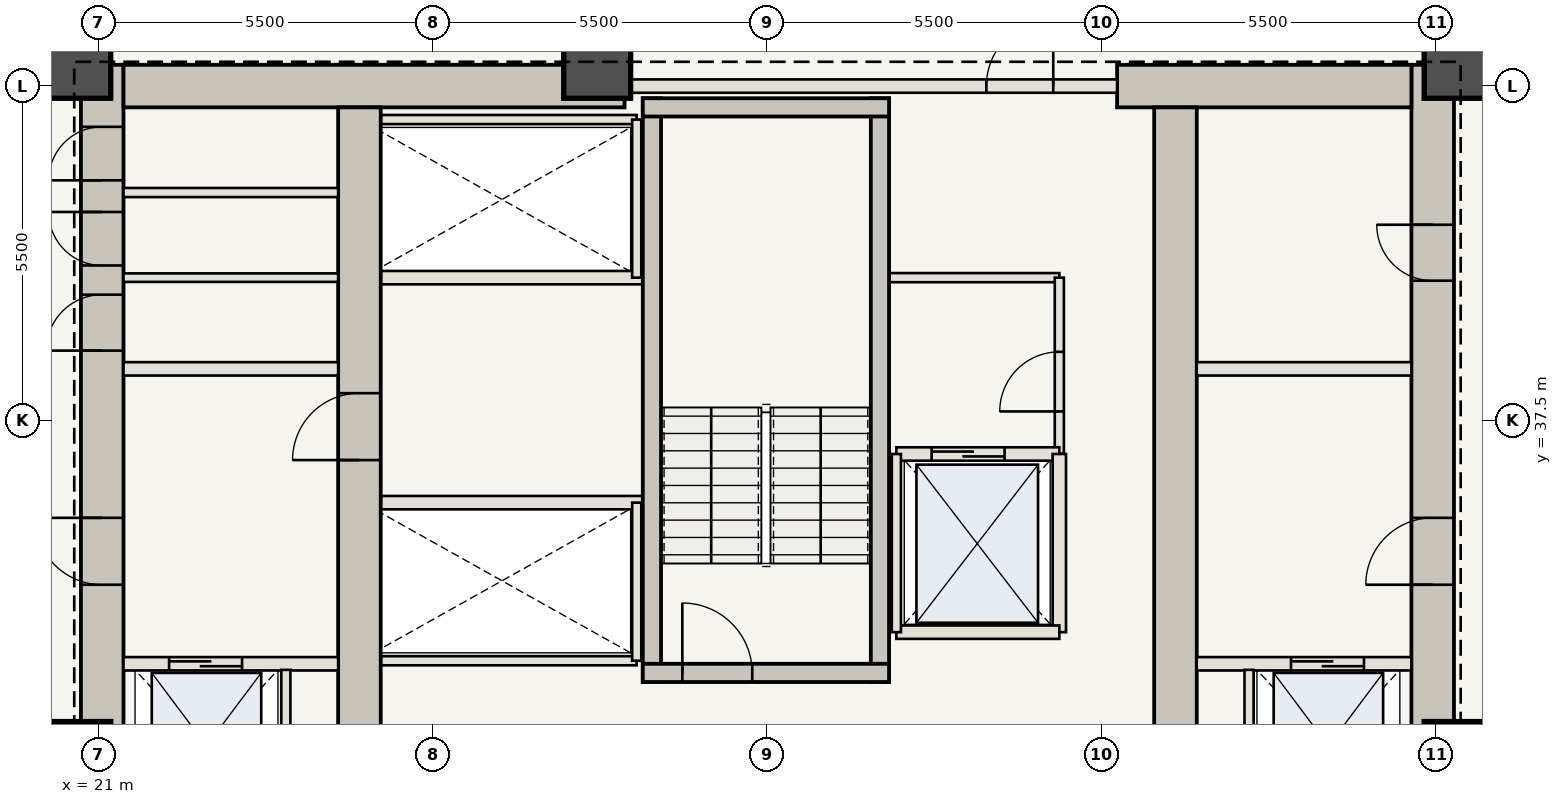
"""IFC4 building model, lengths in metres.
Left out: names, types, materials, properties, quantities, classifications, styles, units other than length and angle.
Written with IfcOpenShell. Run it as: python <this file> out.ifc"""

import sys

from ifc_helpers import new_model, si_unit, direction, frame, frame_2d, origin, origin_2d, place, context, subcontext, project, spatial, rectangle, extrude, element, fill, save


model = new_model("IFC4")
c1 = context("Model", 3, precision=1e-05, world=origin(), true_north=direction((0.0, 1.0)))
c2 = subcontext(c1, "Body", "Model", "MODEL_VIEW")
j1 = project(units=[si_unit("LENGTHUNIT", "METRE"), si_unit("PLANEANGLEUNIT", "RADIAN")], contexts=[c1])
p1 = place(None, origin())
s1 = spatial("IfcSite", under=j1, at=p1, CompositionType="ELEMENT")
p2 = place(p1, origin())
s2 = spatial("IfcBuilding", under=s1, at=p2, CompositionType="ELEMENT")
p3 = place(p2, frame((0.0, 0.0, 63.35)))
s3 = spatial("IfcBuildingStorey", under=s2, at=p3, CompositionType="ELEMENT", Elevation=63.35)
p4 = place(p3, frame((21.06, 30.6, 0.0), z_axis=(0.0, 0.0, 1.0), x_axis=(0.0, 1.0, 0.0)))
e1 = element("IfcWall", 1, at=p4, inside=s3, PredefinedType="SHEAR", context=c2, shape_type="SweptSolid", body=[
    extrude(rectangle(XDim=12.75, YDim=0.7, at=frame_2d((6.375, 0.0))), origin(), (0.0, 0.0, 1.0), 3.5),
])
p5 = place(p4, frame((4.2, 0.0, 0.0)))
e2 = element("IfcOpeningElement", 2, at=p5, cuts=e1, PredefinedType="OPENING", context=c2, shape_type="SweptSolid", body=[
    extrude(rectangle(XDim=1.1, YDim=2.15, at=frame_2d((0.55, 1.075))), frame((0.0, 0.36, 0.0), z_axis=(0.0, -1.0, 0.0), x_axis=(1.0, 0.0, 0.0)), (0.0, 0.0, 1.0), 0.72),
])
p6 = place(p4, frame((8.05, 0.0, 0.0)))
e3 = element("IfcOpeningElement", 3, at=p6, cuts=e1, PredefinedType="OPENING", context=c2, shape_type="SweptSolid", body=[
    extrude(rectangle(XDim=0.92, YDim=2.1, at=frame_2d((0.46, 1.05))), frame((0.0, 0.36, 0.0), z_axis=(0.0, -1.0, 0.0), x_axis=(1.0, 0.0, 0.0)), (0.0, 0.0, 1.0), 0.72),
])
p7 = place(p4, frame((9.45, 0.0, 0.0)))
e4 = element("IfcOpeningElement", 4, at=p7, cuts=e1, PredefinedType="OPENING", context=c2, shape_type="SweptSolid", body=[
    extrude(rectangle(XDim=0.88, YDim=2.1, at=frame_2d((0.44, 1.05))), frame((0.0, 0.36, 0.0), z_axis=(0.0, -1.0, 0.0), x_axis=(1.0, 0.0, 0.0)), (0.0, 0.0, 1.0), 0.72),
])
p8 = place(p4, frame((10.85, 0.0, 0.0)))
e5 = element("IfcOpeningElement", 5, at=p8, cuts=e1, PredefinedType="OPENING", context=c2, shape_type="SweptSolid", body=[
    extrude(rectangle(XDim=0.88, YDim=2.1, at=frame_2d((0.44, 1.05))), frame((0.0, 0.36, 0.0), z_axis=(0.0, -1.0, 0.0), x_axis=(1.0, 0.0, 0.0)), (0.0, 0.0, 1.0), 0.72),
])
p9 = place(p3, frame((42.94, 30.6, 0.0), z_axis=(0.0, 0.0, 1.0), x_axis=(0.0, 1.0, 0.0)))
e6 = element("IfcWall", 6, at=p9, inside=s3, PredefinedType="SHEAR", context=c2, shape_type="SweptSolid", body=[
    extrude(rectangle(XDim=12.75, YDim=0.7, at=frame_2d((6.375, 0.0))), origin(), (0.0, 0.0, 1.0), 3.5),
])
p10 = place(p9, frame((4.2, 0.0, 0.0)))
e7 = element("IfcOpeningElement", 7, at=p10, cuts=e6, PredefinedType="OPENING", context=c2, shape_type="SweptSolid", body=[
    extrude(rectangle(XDim=1.1, YDim=2.15, at=frame_2d((0.55, 1.075))), frame((0.0, 0.36, 0.0), z_axis=(0.0, -1.0, 0.0), x_axis=(1.0, 0.0, 0.0)), (0.0, 0.0, 1.0), 0.72),
])
p11 = place(p9, frame((9.2, 0.0, 0.0)))
e8 = element("IfcOpeningElement", 8, at=p11, cuts=e6, PredefinedType="OPENING", context=c2, shape_type="SweptSolid", body=[
    extrude(rectangle(XDim=0.92, YDim=2.1, at=frame_2d((0.46, 1.05))), frame((0.0, 0.36, 0.0), z_axis=(0.0, -1.0, 0.0), x_axis=(1.0, 0.0, 0.0)), (0.0, 0.0, 1.0), 0.72),
])
p12 = place(p3, frame((21.41, 43.0, 0.0), z_axis=(0.0, 0.0, 1.0), x_axis=(1.0, 0.0, 0.0)))
e9 = element("IfcWall", 9, at=p12, inside=s3, PredefinedType="SHEAR", context=c2, shape_type="SweptSolid", body=[
    extrude(rectangle(XDim=8.24, YDim=0.7, at=frame_2d((4.12, 0.0))), origin(), (0.0, 0.0, 1.0), 3.5),
])
p13 = place(p3, frame((37.75, 43.0, 0.0), z_axis=(0.0, 0.0, 1.0), x_axis=(1.0, 0.0, 0.0)))
e10 = element("IfcWall", 10, at=p13, inside=s3, PredefinedType="SHEAR", context=c2, shape_type="SweptSolid", body=[
    extrude(rectangle(XDim=4.84, YDim=0.7, at=frame_2d((2.42, 0.0))), origin(), (0.0, 0.0, 1.0), 3.5),
])
p14 = place(p3, frame((25.29, 30.6, 0.0), z_axis=(0.0, 0.0, 1.0), x_axis=(0.0, 1.0, 0.0)))
e11 = element("IfcWall", 11, at=p14, inside=s3, PredefinedType="SHEAR", context=c2, shape_type="SweptSolid", body=[
    extrude(rectangle(XDim=12.05, YDim=0.7, at=frame_2d((6.025, 0.0))), origin(), (0.0, 0.0, 1.0), 3.5),
])
p15 = place(p14, frame((6.25, 0.0, 0.0)))
e12 = element("IfcOpeningElement", 12, at=p15, cuts=e11, PredefinedType="OPENING", context=c2, shape_type="SweptSolid", body=[
    extrude(rectangle(XDim=1.1, YDim=2.15, at=frame_2d((0.55, 1.075))), frame((0.0, 0.36, 0.0), z_axis=(0.0, -1.0, 0.0), x_axis=(1.0, 0.0, 0.0)), (0.0, 0.0, 1.0), 0.72),
])
p16 = place(p3, frame((38.71, 30.6, 0.0), z_axis=(0.0, 0.0, 1.0), x_axis=(0.0, 1.0, 0.0)))
e13 = element("IfcWall", 13, at=p16, inside=s3, PredefinedType="SHEAR", context=c2, shape_type="SweptSolid", body=[
    extrude(rectangle(XDim=12.05, YDim=0.7, at=frame_2d((6.025, 0.0))), origin(), (0.0, 0.0, 1.0), 3.5),
])
for number, where, z_axis, x_axis in (
    (14, (43.35, 32.0, 0.0), (0.0, 0.0, 1.0), (1.0, 0.0, 0.0)),
    (15, (43.35, 43.35, 0.0), (0.0, 0.0, 1.0), (1.0, 0.0, 0.0)),
    (16, (29.2, 43.35, 0.0), (0.0, 0.0, 1.0), (1.0, 0.0, 0.0)),
    (17, (20.65, 43.35, 0.0), (0.0, 0.0, 1.0), (1.0, 0.0, 0.0)),
    (18, (20.65, 32.0, 0.0), (0.0, 0.0, 1.0), (1.0, 0.0, 0.0)),
):
    element("IfcColumn", number, at=place(p3, frame(where, z_axis=z_axis, x_axis=x_axis)), inside=s3, PredefinedType="COLUMN", context=c2, shape_type="SweptSolid", body=[
        extrude(rectangle(XDim=1.1, YDim=1.1, at=origin_2d()), origin(), (0.0, 0.0, 1.0), 3.5),
    ])
p17 = place(p3, frame((21.41, 33.5, 0.0), z_axis=(0.0, 0.0, 1.0), x_axis=(1.0, 0.0, 0.0)))
e19 = element("IfcWall", 19, at=p17, inside=s3, PredefinedType="STANDARD", context=c2, shape_type="SweptSolid", body=[
    extrude(rectangle(XDim=3.53, YDim=0.22, at=frame_2d((1.765, 0.0))), origin(), (0.0, 0.0, 1.0), 3.32),
])
p18 = place(p17, frame((0.75, 0.0, 0.0)))
e20 = element("IfcOpeningElement", 20, at=p18, cuts=e19, PredefinedType="OPENING", context=c2, shape_type="SweptSolid", body=[
    extrude(rectangle(XDim=1.2, YDim=2.2, at=frame_2d((0.6, 1.1))), frame((0.0, 0.12, 0.0), z_axis=(0.0, -1.0, 0.0), x_axis=(1.0, 0.0, 0.0)), (0.0, 0.0, 1.0), 0.24),
])
p19 = place(p3, frame((24.08, 30.75, 0.0), z_axis=(0.0, 0.0, 1.0), x_axis=(0.0, 1.0, 0.0)))
e21 = element("IfcWall", 21, at=p19, inside=s3, PredefinedType="STANDARD", context=c2, shape_type="SweptSolid", body=[
    extrude(rectangle(XDim=2.65, YDim=0.15, at=frame_2d((1.325, 0.0))), origin(), (0.0, 0.0, 1.0), 3.32),
])
p20 = place(p3, frame((39.06, 33.5, 0.0), z_axis=(0.0, 0.0, 1.0), x_axis=(1.0, 0.0, 0.0)))
e22 = element("IfcWall", 22, at=p20, inside=s3, PredefinedType="STANDARD", context=c2, shape_type="SweptSolid", body=[
    extrude(rectangle(XDim=3.53, YDim=0.22, at=frame_2d((1.765, 0.0))), origin(), (0.0, 0.0, 1.0), 3.32),
])
p21 = place(p20, frame((1.55, 0.0, 0.0)))
e23 = element("IfcOpeningElement", 23, at=p21, cuts=e22, PredefinedType="OPENING", context=c2, shape_type="SweptSolid", body=[
    extrude(rectangle(XDim=1.2, YDim=2.2, at=frame_2d((0.6, 1.1))), frame((0.0, 0.12, 0.0), z_axis=(0.0, -1.0, 0.0), x_axis=(1.0, 0.0, 0.0)), (0.0, 0.0, 1.0), 0.24),
])
p22 = place(p3, frame((39.92, 30.75, 0.0), z_axis=(0.0, 0.0, 1.0), x_axis=(0.0, 1.0, 0.0)))
e24 = element("IfcWall", 24, at=p22, inside=s3, PredefinedType="STANDARD", context=c2, shape_type="SweptSolid", body=[
    extrude(rectangle(XDim=2.65, YDim=0.15, at=frame_2d((1.325, 0.0))), origin(), (0.0, 0.0, 1.0), 3.32),
])
for number, where, z_axis, x_axis in (
    (25, (21.41, 38.35, 0.0), (0.0, 0.0, 1.0), (1.0, 0.0, 0.0)),
    (26, (39.06, 38.35, 0.0), (0.0, 0.0, 1.0), (1.0, 0.0, 0.0)),
):
    element("IfcWall", number, at=place(p3, frame(where, z_axis=z_axis, x_axis=x_axis)), inside=s3, PredefinedType="STANDARD", context=c2, shape_type="SweptSolid", body=[
        extrude(rectangle(XDim=3.53, YDim=0.22, at=frame_2d((1.765, 0.0))), origin(), (0.0, 0.0, 1.0), 3.32),
    ])
p23 = place(p3, frame((21.41, 39.85, 0.0), z_axis=(0.0, 0.0, 1.0), x_axis=(1.0, 0.0, 0.0)))
e27 = element("IfcWall", 27, at=p23, inside=s3, PredefinedType="STANDARD", context=c2, shape_type="SweptSolid", body=[
    extrude(rectangle(XDim=3.53, YDim=0.14, at=frame_2d((1.765, 0.0))), origin(), (0.0, 0.0, 1.0), 3.32),
])
p24 = place(p3, frame((21.41, 41.25, 0.0), z_axis=(0.0, 0.0, 1.0), x_axis=(1.0, 0.0, 0.0)))
e28 = element("IfcWall", 28, at=p24, inside=s3, PredefinedType="STANDARD", context=c2, shape_type="SweptSolid", body=[
    extrude(rectangle(XDim=3.53, YDim=0.15, at=frame_2d((1.765, 0.0))), origin(), (0.0, 0.0, 1.0), 3.32),
])
p25 = place(p3, frame((34.0, 39.85, 0.0), z_axis=(0.0, 0.0, 1.0), x_axis=(1.0, 0.0, 0.0)))
e29 = element("IfcWall", 29, at=p25, inside=s3, PredefinedType="STANDARD", context=c2, shape_type="SweptSolid", body=[
    extrude(rectangle(XDim=2.8, YDim=0.15, at=frame_2d((1.4, 0.0))), origin(), (0.0, 0.0, 1.0), 3.32),
])
p26 = place(p3, frame((36.8, 36.95, 0.0), z_axis=(0.0, 0.0, 1.0), x_axis=(0.0, 1.0, 0.0)))
e30 = element("IfcWall", 30, at=p26, inside=s3, PredefinedType="STANDARD", context=c2, shape_type="SweptSolid", body=[
    extrude(rectangle(XDim=2.9, YDim=0.15, at=frame_2d((1.45, 0.0))), origin(), (0.0, 0.0, 1.0), 3.32),
])
p27 = place(p26, frame((0.7, 0.0, 0.0)))
e31 = element("IfcOpeningElement", 31, at=p27, cuts=e30, PredefinedType="OPENING", context=c2, shape_type="SweptSolid", body=[
    extrude(rectangle(XDim=0.98, YDim=2.2, at=frame_2d((0.49, 1.1))), frame((0.0, 0.085, 0.0), z_axis=(0.0, -1.0, 0.0), x_axis=(1.0, 0.0, 0.0)), (0.0, 0.0, 1.0), 0.17),
])
p28 = place(p3, frame((25.65, 36.15, 0.0), z_axis=(0.0, 0.0, 1.0), x_axis=(1.0, 0.0, 0.0)))
e32 = element("IfcWall", 32, at=p28, inside=s3, PredefinedType="STANDARD", context=c2, shape_type="SweptSolid", body=[
    extrude(rectangle(XDim=4.3, YDim=0.22, at=frame_2d((2.15, 0.0))), origin(), (0.0, 0.0, 1.0), 3.32),
])
p29 = place(p3, frame((25.65, 33.55, 0.0), z_axis=(0.0, 0.0, 1.0), x_axis=(1.0, 0.0, 0.0)))
e33 = element("IfcWall", 33, at=p29, inside=s3, PredefinedType="STANDARD", context=c2, shape_type="SweptSolid", body=[
    extrude(rectangle(XDim=4.2, YDim=0.15, at=frame_2d((2.1, 0.0))), origin(), (0.0, 0.0, 1.0), 3.32),
])
p30 = place(p3, frame((29.85, 33.55, 0.0), z_axis=(0.0, 0.0, 1.0), x_axis=(0.0, 1.0, 0.0)))
e34 = element("IfcWall", 34, at=p30, inside=s3, PredefinedType="STANDARD", context=c2, shape_type="SweptSolid", body=[
    extrude(rectangle(XDim=2.6, YDim=0.15, at=frame_2d((1.3, 0.0))), origin(), (0.0, 0.0, 1.0), 3.32),
])
p31 = place(p3, frame((25.65, 39.85, 0.0), z_axis=(0.0, 0.0, 1.0), x_axis=(1.0, 0.0, 0.0)))
e35 = element("IfcWall", 35, at=p31, inside=s3, PredefinedType="STANDARD", context=c2, shape_type="SweptSolid", body=[
    extrude(rectangle(XDim=4.3, YDim=0.22, at=frame_2d((2.15, 0.0))), origin(), (0.0, 0.0, 1.0), 3.32),
])
p32 = place(p3, frame((25.65, 42.45, 0.0), z_axis=(0.0, 0.0, 1.0), x_axis=(1.0, 0.0, 0.0)))
e36 = element("IfcWall", 36, at=p32, inside=s3, PredefinedType="STANDARD", context=c2, shape_type="SweptSolid", body=[
    extrude(rectangle(XDim=4.2, YDim=0.15, at=frame_2d((2.1, 0.0))), origin(), (0.0, 0.0, 1.0), 3.32),
])
p33 = place(p3, frame((29.85, 39.85, 0.0), z_axis=(0.0, 0.0, 1.0), x_axis=(0.0, 1.0, 0.0)))
e37 = element("IfcWall", 37, at=p33, inside=s3, PredefinedType="STANDARD", context=c2, shape_type="SweptSolid", body=[
    extrude(rectangle(XDim=2.6, YDim=0.15, at=frame_2d((1.3, 0.0))), origin(), (0.0, 0.0, 1.0), 3.32),
])
for number, where, z_axis, x_axis in (
    (38, (30.1, 33.2, 0.0), (0.0, 0.0, 1.0), (0.0, 1.0, 0.0)),
    (39, (33.85, 33.2, 0.0), (0.0, 0.0, 1.0), (0.0, 1.0, 0.0)),
):
    element("IfcWall", number, at=place(p3, frame(where, z_axis=z_axis, x_axis=x_axis)), inside=s3, PredefinedType="SHEAR", context=c2, shape_type="SweptSolid", body=[
        extrude(rectangle(XDim=9.6, YDim=0.3, at=frame_2d((4.8, 0.0))), origin(), (0.0, 0.0, 1.0), 3.32),
    ])
p34 = place(p3, frame((29.95, 33.35, 0.0), z_axis=(0.0, 0.0, 1.0), x_axis=(1.0, 0.0, 0.0)))
e40 = element("IfcWall", 40, at=p34, inside=s3, PredefinedType="SHEAR", context=c2, shape_type="SweptSolid", body=[
    extrude(rectangle(XDim=4.05, YDim=0.3, at=frame_2d((2.025, 0.0))), origin(), (0.0, 0.0, 1.0), 3.32),
])
p35 = place(p34, frame((0.65, 0.0, 0.0)))
e41 = element("IfcOpeningElement", 41, at=p35, cuts=e40, PredefinedType="OPENING", context=c2, shape_type="SweptSolid", body=[
    extrude(rectangle(XDim=1.15, YDim=2.15, at=frame_2d((0.575, 1.075))), frame((0.0, 0.16, 0.0), z_axis=(0.0, -1.0, 0.0), x_axis=(1.0, 0.0, 0.0)), (0.0, 0.0, 1.0), 0.32),
])
p36 = place(p3, frame((29.95, 42.65, 0.0), z_axis=(0.0, 0.0, 1.0), x_axis=(1.0, 0.0, 0.0)))
e42 = element("IfcWall", 42, at=p36, inside=s3, PredefinedType="SHEAR", context=c2, shape_type="SweptSolid", body=[
    extrude(rectangle(XDim=4.05, YDim=0.3, at=frame_2d((2.025, 0.0))), origin(), (0.0, 0.0, 1.0), 3.32),
])
p37 = place(p3, frame((29.65, 43.0, 0.0), z_axis=(0.0, 0.0, 1.0), x_axis=(1.0, 0.0, 0.0)))
e43 = element("IfcWall", 43, at=p37, inside=s3, PredefinedType="STANDARD", context=c2, shape_type="SweptSolid", body=[
    extrude(rectangle(XDim=8.1, YDim=0.22, at=frame_2d((4.05, 0.0))), origin(), (0.0, 0.0, 1.0), 3.32),
])
p38 = place(p37, frame((5.95, 0.0, 0.0)))
e44 = element("IfcOpeningElement", 44, at=p38, cuts=e43, PredefinedType="OPENING", context=c2, shape_type="SweptSolid", body=[
    extrude(rectangle(XDim=1.1, YDim=2.15, at=frame_2d((0.55, 1.075))), frame((0.0, 0.12, 0.0), z_axis=(0.0, -1.0, 0.0), x_axis=(1.0, 0.0, 0.0)), (0.0, 0.0, 1.0), 0.24),
])
p39 = place(p3, frame((34.12, 36.95, 0.0), z_axis=(0.0, 0.0, 1.0), x_axis=(1.0, 0.0, 0.0)))
e45 = element("IfcWall", 45, at=p39, inside=s3, PredefinedType="STANDARD", context=c2, shape_type="SweptSolid", body=[
    extrude(rectangle(XDim=2.68, YDim=0.22, at=frame_2d((1.34, 0.0))), origin(), (0.0, 0.0, 1.0), 3.32),
])
p40 = place(p39, frame((0.58, 0.0, 0.0)))
e46 = element("IfcOpeningElement", 46, at=p40, cuts=e45, PredefinedType="OPENING", context=c2, shape_type="SweptSolid", body=[
    extrude(rectangle(XDim=1.2, YDim=2.2, at=frame_2d((0.6, 1.1))), frame((0.0, 0.12, 0.0), z_axis=(0.0, -1.0, 0.0), x_axis=(1.0, 0.0, 0.0)), (0.0, 0.0, 1.0), 0.24),
])
p41 = place(p3, frame((36.8, 34.02, 0.0), z_axis=(0.0, 0.0, 1.0), x_axis=(0.0, 1.0, 0.0)))
e47 = element("IfcWall", 47, at=p41, inside=s3, PredefinedType="STANDARD", context=c2, shape_type="SweptSolid", body=[
    extrude(rectangle(XDim=2.93, YDim=0.22, at=frame_2d((1.465, 0.0))), origin(), (0.0, 0.0, 1.0), 3.32),
])
p42 = place(p3, frame((34.12, 34.02, 0.0), z_axis=(0.0, 0.0, 1.0), x_axis=(1.0, 0.0, 0.0)))
e48 = element("IfcWall", 48, at=p42, inside=s3, PredefinedType="STANDARD", context=c2, shape_type="SweptSolid", body=[
    extrude(rectangle(XDim=2.68, YDim=0.22, at=frame_2d((1.34, 0.0))), origin(), (0.0, 0.0, 1.0), 3.32),
])
p43 = place(p3, frame((34.12, 34.02, 0.0), z_axis=(0.0, 0.0, 1.0), x_axis=(0.0, 1.0, 0.0)))
e49 = element("IfcWall", 49, at=p43, inside=s3, PredefinedType="STANDARD", context=c2, shape_type="SweptSolid", body=[
    extrude(rectangle(XDim=2.93, YDim=0.15, at=frame_2d((1.465, 0.0))), origin(), (0.0, 0.0, 1.0), 3.32),
])
p44 = place(p5, origin())
e50 = element("IfcDoor", 50, at=p44, inside=s3, OperationType="SINGLE_SWING_RIGHT", PredefinedType="DOOR", context=c2, shape_type="SweptSolid", body=[
    extrude(rectangle(XDim=1.1, YDim=2.15, at=frame_2d((0.55, 1.075))), frame((0.0, 0.025, 0.0), z_axis=(0.0, -1.0, 0.0), x_axis=(1.0, 0.0, 0.0)), (0.0, 0.0, 1.0), 0.05),
])
fill(e2, e50)
p45 = place(p10, origin())
e51 = element("IfcDoor", 51, at=p45, inside=s3, OperationType="SINGLE_SWING_LEFT", PredefinedType="DOOR", context=c2, shape_type="SweptSolid", body=[
    extrude(rectangle(XDim=1.1, YDim=2.15, at=frame_2d((0.55, 1.075))), frame((0.0, 0.025, 0.0), z_axis=(0.0, -1.0, 0.0), x_axis=(1.0, 0.0, 0.0)), (0.0, 0.0, 1.0), 0.05),
])
fill(e7, e51)
p46 = place(p15, origin())
e52 = element("IfcDoor", 52, at=p46, inside=s3, OperationType="SINGLE_SWING_LEFT", PredefinedType="DOOR", context=c2, shape_type="SweptSolid", body=[
    extrude(rectangle(XDim=1.1, YDim=2.15, at=frame_2d((0.55, 1.075))), frame((0.0, 0.025, 0.0), z_axis=(0.0, -1.0, 0.0), x_axis=(1.0, 0.0, 0.0)), (0.0, 0.0, 1.0), 0.05),
])
fill(e12, e52)
p47 = place(p6, origin())
e53 = element("IfcDoor", 53, at=p47, inside=s3, OperationType="SINGLE_SWING_LEFT", PredefinedType="DOOR", context=c2, shape_type="SweptSolid", body=[
    extrude(rectangle(XDim=0.92, YDim=2.1, at=frame_2d((0.46, 1.05))), frame((0.0, 0.025, 0.0), z_axis=(0.0, -1.0, 0.0), x_axis=(1.0, 0.0, 0.0)), (0.0, 0.0, 1.0), 0.05),
])
fill(e3, e53)
p48 = place(p7, origin())
e54 = element("IfcDoor", 54, at=p48, inside=s3, OperationType="SINGLE_SWING_RIGHT", PredefinedType="DOOR", context=c2, shape_type="SweptSolid", body=[
    extrude(rectangle(XDim=0.88, YDim=2.1, at=frame_2d((0.44, 1.05))), frame((0.0, 0.025, 0.0), z_axis=(0.0, -1.0, 0.0), x_axis=(1.0, 0.0, 0.0)), (0.0, 0.0, 1.0), 0.05),
])
fill(e4, e54)
p49 = place(p8, origin())
e55 = element("IfcDoor", 55, at=p49, inside=s3, OperationType="SINGLE_SWING_LEFT", PredefinedType="DOOR", context=c2, shape_type="SweptSolid", body=[
    extrude(rectangle(XDim=0.88, YDim=2.1, at=frame_2d((0.44, 1.05))), frame((0.0, 0.025, 0.0), z_axis=(0.0, -1.0, 0.0), x_axis=(1.0, 0.0, 0.0)), (0.0, 0.0, 1.0), 0.05),
])
fill(e5, e55)
p50 = place(p11, origin())
e56 = element("IfcDoor", 56, at=p50, inside=s3, OperationType="SINGLE_SWING_RIGHT", PredefinedType="DOOR", context=c2, shape_type="SweptSolid", body=[
    extrude(rectangle(XDim=0.92, YDim=2.1, at=frame_2d((0.46, 1.05))), frame((0.0, 0.025, 0.0), z_axis=(0.0, -1.0, 0.0), x_axis=(1.0, 0.0, 0.0)), (0.0, 0.0, 1.0), 0.05),
])
fill(e8, e56)
p51 = place(p18, origin())
e57 = element("IfcDoor", 57, at=p51, inside=s3, OperationType="DOUBLE_DOOR_SLIDING", PredefinedType="DOOR", context=c2, shape_type="SweptSolid", body=[
    extrude(rectangle(XDim=1.2, YDim=2.2, at=frame_2d((0.6, 1.1))), frame((0.0, 0.025, 0.0), z_axis=(0.0, -1.0, 0.0), x_axis=(1.0, 0.0, 0.0)), (0.0, 0.0, 1.0), 0.05),
])
fill(e20, e57)
p52 = place(p21, origin())
e58 = element("IfcDoor", 58, at=p52, inside=s3, OperationType="DOUBLE_DOOR_SLIDING", PredefinedType="DOOR", context=c2, shape_type="SweptSolid", body=[
    extrude(rectangle(XDim=1.2, YDim=2.2, at=frame_2d((0.6, 1.1))), frame((0.0, 0.025, 0.0), z_axis=(0.0, -1.0, 0.0), x_axis=(1.0, 0.0, 0.0)), (0.0, 0.0, 1.0), 0.05),
])
fill(e23, e58)
p53 = place(p27, origin())
e59 = element("IfcDoor", 59, at=p53, inside=s3, OperationType="SINGLE_SWING_LEFT", PredefinedType="DOOR", context=c2, shape_type="SweptSolid", body=[
    extrude(rectangle(XDim=0.98, YDim=2.2, at=frame_2d((0.49, 1.1))), frame((0.0, 0.025, 0.0), z_axis=(0.0, -1.0, 0.0), x_axis=(1.0, 0.0, 0.0)), (0.0, 0.0, 1.0), 0.05),
])
fill(e31, e59)
p54 = place(p35, origin())
e60 = element("IfcDoor", 60, at=p54, inside=s3, OperationType="SINGLE_SWING_LEFT", PredefinedType="DOOR", context=c2, shape_type="SweptSolid", body=[
    extrude(rectangle(XDim=1.15, YDim=2.15, at=frame_2d((0.575, 1.075))), frame((0.0, 0.025, 0.0), z_axis=(0.0, -1.0, 0.0), x_axis=(1.0, 0.0, 0.0)), (0.0, 0.0, 1.0), 0.05),
])
fill(e41, e60)
p55 = place(p38, origin())
e61 = element("IfcDoor", 61, at=p55, inside=s3, OperationType="SINGLE_SWING_RIGHT", PredefinedType="DOOR", context=c2, shape_type="SweptSolid", body=[
    extrude(rectangle(XDim=1.1, YDim=2.15, at=frame_2d((0.55, 1.075))), frame((0.0, 0.025, 0.0), z_axis=(0.0, -1.0, 0.0), x_axis=(1.0, 0.0, 0.0)), (0.0, 0.0, 1.0), 0.05),
])
fill(e44, e61)
p56 = place(p40, origin())
e62 = element("IfcDoor", 62, at=p56, inside=s3, OperationType="DOUBLE_DOOR_SLIDING", PredefinedType="DOOR", context=c2, shape_type="SweptSolid", body=[
    extrude(rectangle(XDim=1.2, YDim=2.2, at=frame_2d((0.6, 1.1))), frame((0.0, 0.025, 0.0), z_axis=(0.0, -1.0, 0.0), x_axis=(1.0, 0.0, 0.0)), (0.0, 0.0, 1.0), 0.05),
])
fill(e46, e62)
save(model, sys.argv[1])
